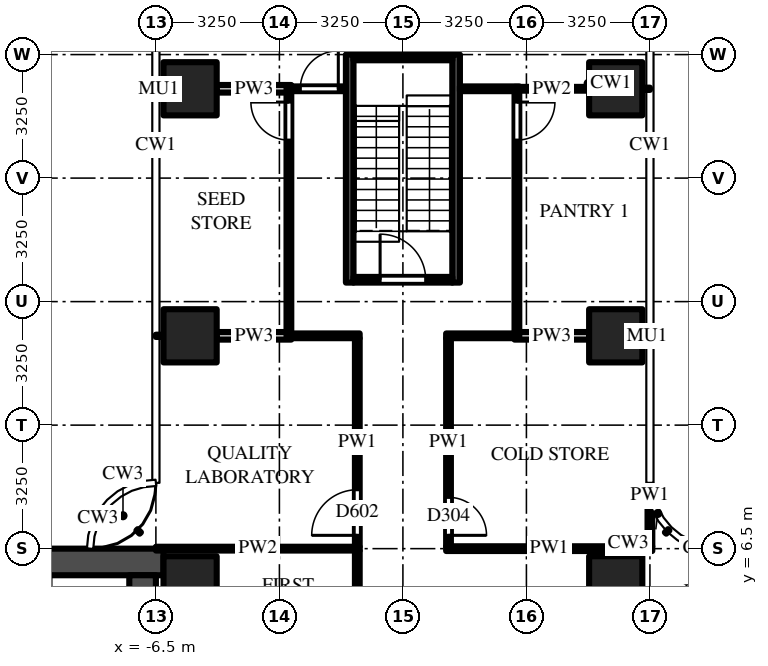
"""IFC4 building model, lengths in metres.
Left out: names, types, materials, properties, quantities, classifications, styles, units other than length and angle.
Written with IfcOpenShell. Run it as: python <this file> out.ifc"""

import sys

from ifc_helpers import new_model, si_unit, direction, frame, frame_2d, origin, origin_2d, place, context, subcontext, project, spatial, rectangle, extrude, source, transform, mapped, element, fill, save


model = new_model("IFC4")
c1 = context("Model", 3, precision=1e-05, world=origin(), true_north=direction((0.0, 1.0)))
c2 = subcontext(c1, "Body", "Model", "MODEL_VIEW")
j1 = project(units=[si_unit("LENGTHUNIT", "METRE"), si_unit("PLANEANGLEUNIT", "RADIAN")], contexts=[c1])
p1 = place(None, origin())
s1 = spatial("IfcSite", under=j1, at=p1, CompositionType="ELEMENT")
p2 = place(p1, origin())
s2 = spatial("IfcBuilding", under=s1, at=p2, CompositionType="ELEMENT")
p3 = place(p2, frame((0.0, 0.0, 38.5)))
s3 = spatial("IfcBuildingStorey", under=s2, at=p3, CompositionType="ELEMENT", Elevation=38.5)
m1 = source(origin(), c2, "Body", "SweptSolid", [
    extrude(rectangle(XDim=1.4, YDim=1.4, at=origin_2d()), origin(), (0.0, 0.0, 1.0), 4.5),
])
for number, where, z_axis, x_axis in (
    (1, (-5.6, 12.1, 0.0), (0.0, 0.0, 1.0), (1.0, 0.0, 0.0)),
    (2, (-5.6, 18.6, 0.0), (0.0, 0.0, 1.0), (1.0, 0.0, 0.0)),
    (3, (5.6, 12.1, 0.0), (0.0, 0.0, 1.0), (1.0, 0.0, 0.0)),
    (4, (5.6, 18.6, 0.0), (0.0, 0.0, 1.0), (1.0, 0.0, 0.0)),
    (5, (5.6, 5.6, 0.0), (0.0, 0.0, 1.0), (1.0, 0.0, 0.0)),
    (6, (-5.6, 5.6, 0.0), (0.0, 0.0, 1.0), (1.0, 0.0, 0.0)),
):
    element("IfcColumn", number, at=place(p3, frame(where, z_axis=z_axis, x_axis=x_axis)), inside=s3, PredefinedType="COLUMN", context=c2, shape_type="MappedRepresentation", body=[
        mapped(m1, transform((0.0, 0.0, 0.0))),
    ])
m2 = source(origin(), c2, "Body", "SweptSolid", [
    extrude(rectangle(XDim=16.45, YDim=0.7, at=frame_2d((8.225, 0.0))), origin(), (0.0, 0.0, 1.0), 4.25),
])
p4 = place(p3, frame((-6.3, 6.15, 0.0), z_axis=(0.0, 0.0, 1.0), x_axis=(-1.0, 0.0, 0.0)))
e7 = element("IfcWall", 7, at=p4, inside=s3, PredefinedType="SHEAR", context=c2, shape_type="MappedRepresentation", body=[
    mapped(m2, transform((0.0, 0.0, 0.0))),
])
m3 = source(origin(), c2, "Body", "SweptSolid", [
    extrude(rectangle(XDim=9.05, YDim=0.7, at=frame_2d((4.525, 0.0))), origin(), (0.0, 0.0, 1.0), 4.25),
])
p5 = place(p3, frame((-6.85, 5.8, 0.0), z_axis=(0.0, 0.0, 1.0), x_axis=(0.0, -1.0, 0.0)))
e8 = element("IfcWall", 8, at=p5, inside=s3, PredefinedType="SHEAR", context=c2, shape_type="MappedRepresentation", body=[
    mapped(m3, transform((0.0, 0.0, 0.0))),
])
m4 = source(origin(), c2, "Body", "SweptSolid", [
    extrude(rectangle(XDim=1.8, YDim=2.1, at=frame_2d((0.9, 1.05))), frame((0.0, 0.36, 0.0), z_axis=(0.0, -1.0, 0.0), x_axis=(1.0, 0.0, 0.0)), (0.0, 0.0, 1.0), 0.72),
])
p6 = place(p5, frame((3.15, 0.0, 0.0)))
e9 = element("IfcOpeningElement", 9, at=p6, cuts=e8, PredefinedType="OPENING", context=c2, shape_type="MappedRepresentation", body=[
    mapped(m4, transform((0.0, 0.0, 0.0))),
])
m5 = source(origin(), c2, "Body", "SweptSolid", [
    extrude(rectangle(XDim=6.0, YDim=0.2, at=frame_2d((3.0, 0.0))), origin(), (0.0, 0.0, 1.0), 4.25),
])
for number, where, z_axis, x_axis in (
    (10, (-1.4, 13.5, 0.0), (0.0, 0.0, 1.0), (0.0, 1.0, 0.0)),
    (11, (1.4, 13.5, 0.0), (0.0, 0.0, 1.0), (0.0, 1.0, 0.0)),
):
    element("IfcWall", number, at=place(p3, frame(where, z_axis=z_axis, x_axis=x_axis)), inside=s3, PredefinedType="SHEAR", context=c2, shape_type="MappedRepresentation", body=[
        mapped(m5, transform((0.0, 0.0, 0.0))),
    ])
m6 = source(origin(), c2, "Body", "SweptSolid", [
    extrude(rectangle(XDim=2.6, YDim=0.15, at=frame_2d((1.3, 0.0))), origin(), (0.0, 0.0, 1.0), 4.25),
])
p7 = place(p3, frame((-1.3, 13.575, 0.0), z_axis=(0.0, 0.0, 1.0), x_axis=(1.0, 0.0, 0.0)))
e12 = element("IfcWall", 12, at=p7, inside=s3, PredefinedType="SHEAR", context=c2, shape_type="MappedRepresentation", body=[
    mapped(m6, transform((0.0, 0.0, 0.0))),
])
m7 = source(origin(), c2, "Body", "SweptSolid", [
    extrude(rectangle(XDim=1.2, YDim=2.1, at=frame_2d((0.6, 1.05))), frame((0.0, 0.085, 0.0), z_axis=(0.0, -1.0, 0.0), x_axis=(1.0, 0.0, 0.0)), (0.0, 0.0, 1.0), 0.17),
])
p8 = place(p7, frame((0.7, 0.0, 0.0)))
e13 = element("IfcOpeningElement", 13, at=p8, cuts=e12, PredefinedType="OPENING", context=c2, shape_type="MappedRepresentation", body=[
    mapped(m7, transform((0.0, 0.0, 0.0))),
])
p9 = place(p3, frame((-1.3, 19.425, 0.0), z_axis=(0.0, 0.0, 1.0), x_axis=(1.0, 0.0, 0.0)))
e14 = element("IfcWall", 14, at=p9, inside=s3, PredefinedType="SHEAR", context=c2, shape_type="MappedRepresentation", body=[
    mapped(m6, transform((0.0, 0.0, 0.0))),
])
m8 = source(origin(), c2, "Body", "SweptSolid", [
    extrude(rectangle(XDim=6.3, YDim=0.125, at=frame_2d((3.15, 0.0))), origin(), (0.0, 0.0, 1.0), 3.468),
])
p10 = place(p3, frame((-3.0, 12.2, 0.0), z_axis=(0.0, 0.0, 1.0), x_axis=(0.0, 1.0, 0.0)))
e15 = element("IfcWall", 15, at=p10, inside=s3, PredefinedType="PARTITIONING", context=c2, shape_type="MappedRepresentation", body=[
    mapped(m8, transform((0.0, 0.0, 0.0))),
])
m9 = source(origin(), c2, "Body", "SweptSolid", [
    extrude(rectangle(XDim=1.0, YDim=2.1, at=frame_2d((0.5, 1.05))), frame((0.0, 0.073, 0.0), z_axis=(0.0, -1.0, 0.0), x_axis=(1.0, 0.0, 0.0)), (0.0, 0.0, 1.0), 0.145),
])
p11 = place(p10, frame((5.05, 0.0, 0.0)))
e16 = element("IfcOpeningElement", 16, at=p11, cuts=e15, PredefinedType="OPENING", context=c2, shape_type="MappedRepresentation", body=[
    mapped(m9, transform((0.0, 0.0, 0.0))),
])
m10 = source(origin(), c2, "Body", "SweptSolid", [
    extrude(rectangle(XDim=3.137, YDim=0.125, at=frame_2d((1.569, 0.0))), origin(), (0.0, 0.0, 1.0), 3.468),
])
p12 = place(p3, frame((-1.2, 6.45, 0.0), z_axis=(0.0, 0.0, 1.0), x_axis=(0.0, -1.0, 0.0)))
e17 = element("IfcWall", 17, at=p12, inside=s3, PredefinedType="PARTITIONING", context=c2, shape_type="MappedRepresentation", body=[
    mapped(m10, transform((0.0, 0.0, 0.0))),
])
m11 = source(origin(), c2, "Body", "SweptSolid", [
    extrude(rectangle(XDim=5.488, YDim=0.125, at=frame_2d((2.744, 0.0))), origin(), (0.0, 0.0, 1.0), 3.468),
])
p13 = place(p3, frame((-1.2, 6.55, 0.0), z_axis=(0.0, 0.0, 1.0), x_axis=(0.0, 1.0, 0.0)))
e18 = element("IfcWall", 18, at=p13, inside=s3, PredefinedType="PARTITIONING", context=c2, shape_type="MappedRepresentation", body=[
    mapped(m11, transform((0.0, 0.0, 0.0))),
])
m12 = source(origin(), c2, "Body", "SweptSolid", [
    extrude(rectangle(XDim=1.2, YDim=2.1, at=frame_2d((0.6, 1.05))), frame((0.0, 0.073, 0.0), z_axis=(0.0, -1.0, 0.0), x_axis=(1.0, 0.0, 0.0)), (0.0, 0.0, 1.0), 0.145),
])
p14 = place(p13, frame((0.3, 0.0, 0.0)))
e19 = element("IfcOpeningElement", 19, at=p14, cuts=e18, PredefinedType="OPENING", context=c2, shape_type="MappedRepresentation", body=[
    mapped(m12, transform((0.0, 0.0, 0.0))),
])
m13 = source(origin(), c2, "Body", "SweptSolid", [
    extrude(rectangle(XDim=5.475, YDim=0.125, at=frame_2d((2.738, 0.0))), origin(), (0.0, 0.0, 1.0), 3.468),
])
p15 = place(p3, frame((1.2, 12.038, 0.0), z_axis=(0.0, 0.0, 1.0), x_axis=(0.0, -1.0, 0.0)))
e20 = element("IfcWall", 20, at=p15, inside=s3, PredefinedType="PARTITIONING", context=c2, shape_type="MappedRepresentation", body=[
    mapped(m13, transform((0.0, 0.0, 0.0))),
])
p16 = place(p15, frame((4.188, 0.0, 0.0)))
e21 = element("IfcOpeningElement", 21, at=p16, cuts=e20, PredefinedType="OPENING", context=c2, shape_type="MappedRepresentation", body=[
    mapped(m9, transform((0.0, 0.0, 0.0))),
])
m14 = source(origin(), c2, "Body", "SweptSolid", [
    extrude(rectangle(XDim=6.35, YDim=0.125, at=frame_2d((3.175, 0.0))), origin(), (0.0, 0.0, 1.0), 3.468),
])
p17 = place(p3, frame((3.0, 18.55, 0.0), z_axis=(0.0, 0.0, 1.0), x_axis=(0.0, -1.0, 0.0)))
e22 = element("IfcWall", 22, at=p17, inside=s3, PredefinedType="PARTITIONING", context=c2, shape_type="MappedRepresentation", body=[
    mapped(m14, transform((0.0, 0.0, 0.0))),
])
p18 = place(p17, frame((0.3, 0.0, 0.0)))
e23 = element("IfcOpeningElement", 23, at=p18, cuts=e22, PredefinedType="OPENING", context=c2, shape_type="MappedRepresentation", body=[
    mapped(m9, transform((0.0, 0.0, 0.0))),
])
m15 = source(origin(), c2, "Body", "SweptSolid", [
    extrude(rectangle(XDim=1.469, YDim=0.125, at=frame_2d((0.734, 0.0))), origin(), (0.0, 0.0, 1.0), 4.25),
])
p19 = place(p3, frame((6.5, 6.562, 0.0), z_axis=(0.0, 0.0, 1.0), x_axis=(0.0, 1.0, 0.0)))
e24 = element("IfcWall", 24, at=p19, inside=s3, PredefinedType="PARTITIONING", context=c2, shape_type="MappedRepresentation", body=[
    mapped(m15, transform((0.0, 0.0, 0.0))),
])
m16 = source(origin(), c2, "Body", "SweptSolid", [
    extrude(rectangle(XDim=5.363, YDim=0.1, at=frame_2d((2.681, 0.0))), origin(), (0.0, 0.0, 1.0), 3.33),
])
p20 = place(p3, frame((-6.5, 6.5, 0.0), z_axis=(0.0, 0.0, 1.0), x_axis=(1.0, 0.0, 0.0)))
e25 = element("IfcWall", 25, at=p20, inside=s3, PredefinedType="PARTITIONING", context=c2, shape_type="MappedRepresentation", body=[
    mapped(m16, transform((0.0, 0.0, 0.0))),
])
m17 = source(origin(), c2, "Body", "SweptSolid", [
    extrude(rectangle(XDim=5.425, YDim=0.125, at=frame_2d((2.712, 0.0))), origin(), (0.0, 0.0, 1.0), 3.33),
])
p21 = place(p3, frame((1.137, 6.5, 0.0), z_axis=(0.0, 0.0, 1.0), x_axis=(1.0, 0.0, 0.0)))
e26 = element("IfcWall", 26, at=p21, inside=s3, PredefinedType="PARTITIONING", context=c2, shape_type="MappedRepresentation", body=[
    mapped(m17, transform((0.0, 0.0, 0.0))),
])
m18 = source(origin(), c2, "Body", "SweptSolid", [
    extrude(rectangle(XDim=1.962, YDim=0.2, at=frame_2d((0.981, 0.0))), origin(), (0.0, 0.0, 1.0), 3.468),
])
for number, where, z_axis, x_axis in (
    (27, (-4.9, 12.1, 0.0), (0.0, 0.0, 1.0), (1.0, 0.0, 0.0)),
    (28, (2.938, 12.1, 0.0), (0.0, 0.0, 1.0), (1.0, 0.0, 0.0)),
):
    element("IfcWall", number, at=place(p3, frame(where, z_axis=z_axis, x_axis=x_axis)), inside=s3, PredefinedType="PARTITIONING", context=c2, shape_type="MappedRepresentation", body=[
        mapped(m18, transform((0.0, 0.0, 0.0))),
    ])
m19 = source(origin(), c2, "Body", "SweptSolid", [
    extrude(rectangle(XDim=1.925, YDim=0.125, at=frame_2d((0.962, 0.0))), origin(), (0.0, 0.0, 1.0), 3.468),
])
for number, where, z_axis, x_axis in (
    (29, (-1.137, 12.1, 0.0), (0.0, 0.0, 1.0), (-1.0, 0.0, 0.0)),
    (30, (3.062, 12.1, 0.0), (0.0, 0.0, 1.0), (-1.0, 0.0, 0.0)),
):
    element("IfcWall", number, at=place(p3, frame(where, z_axis=z_axis, x_axis=x_axis)), inside=s3, PredefinedType="PARTITIONING", context=c2, shape_type="MappedRepresentation", body=[
        mapped(m19, transform((0.0, 0.0, 0.0))),
    ])
m20 = source(origin(), c2, "Body", "SweptSolid", [
    extrude(rectangle(XDim=1.962, YDim=0.2, at=frame_2d((0.981, 0.0))), origin(), (0.0, 0.0, 1.0), 3.697),
])
p22 = place(p3, frame((-4.9, 18.6, 0.0), z_axis=(0.0, 0.0, 1.0), x_axis=(1.0, 0.0, 0.0)))
e31 = element("IfcWall", 31, at=p22, inside=s3, PredefinedType="PARTITIONING", context=c2, shape_type="MappedRepresentation", body=[
    mapped(m20, transform((0.0, 0.0, 0.0))),
])
m21 = source(origin(), c2, "Body", "SweptSolid", [
    extrude(rectangle(XDim=1.962, YDim=0.1, at=frame_2d((0.981, 0.0))), origin(), (0.0, 0.0, 1.0), 3.697),
])
p23 = place(p3, frame((2.938, 18.6, 0.0), z_axis=(0.0, 0.0, 1.0), x_axis=(1.0, 0.0, 0.0)))
e32 = element("IfcWall", 32, at=p23, inside=s3, PredefinedType="PARTITIONING", context=c2, shape_type="MappedRepresentation", body=[
    mapped(m21, transform((0.0, 0.0, 0.0))),
])
m22 = source(origin(), c2, "Body", "SweptSolid", [
    extrude(rectangle(XDim=1.562, YDim=0.125, at=frame_2d((0.781, 0.0))), origin(), (0.0, 0.0, 1.0), 3.697),
])
p24 = place(p3, frame((-3.062, 18.6, 0.0), z_axis=(0.0, 0.0, 1.0), x_axis=(1.0, 0.0, 0.0)))
e33 = element("IfcWall", 33, at=p24, inside=s3, PredefinedType="PARTITIONING", context=c2, shape_type="MappedRepresentation", body=[
    mapped(m22, transform((0.0, 0.0, 0.0))),
])
p25 = place(p24, frame((0.363, 0.0, 0.0)))
e34 = element("IfcOpeningElement", 34, at=p25, cuts=e33, PredefinedType="OPENING", context=c2, shape_type="MappedRepresentation", body=[
    mapped(m9, transform((0.0, 0.0, 0.0))),
])
p26 = place(p3, frame((1.5, 18.6, 0.0), z_axis=(0.0, 0.0, 1.0), x_axis=(1.0, 0.0, 0.0)))
e35 = element("IfcWall", 35, at=p26, inside=s3, PredefinedType="PARTITIONING", context=c2, shape_type="MappedRepresentation", body=[
    mapped(m22, transform((0.0, 0.0, 0.0))),
])
m23 = source(origin(), c2, "Body", "SweptSolid", [
    extrude(rectangle(XDim=1.2, YDim=2.1, at=frame_2d((0.6, 1.05))), frame((0.0, 0.025, 0.0), z_axis=(0.0, -1.0, 0.0), x_axis=(1.0, 0.0, 0.0)), (0.0, 0.0, 1.0), 0.05),
])
p27 = place(p8, origin())
e36 = element("IfcDoor", 36, at=p27, inside=s3, OperationType="SINGLE_SWING_LEFT", PredefinedType="DOOR", context=c2, shape_type="MappedRepresentation", body=[
    mapped(m23, transform((0.0, 0.0, 0.0))),
])
fill(e13, e36)
m24 = source(origin(), c2, "Body", "SweptSolid", [
    extrude(rectangle(XDim=1.0, YDim=2.1, at=frame_2d((0.5, 1.05))), frame((0.0, 0.025, 0.0), z_axis=(0.0, -1.0, 0.0), x_axis=(1.0, 0.0, 0.0)), (0.0, 0.0, 1.0), 0.05),
])
p28 = place(p16, origin())
e37 = element("IfcDoor", 37, at=p28, inside=s3, OperationType="SINGLE_SWING_RIGHT", PredefinedType="DOOR", context=c2, shape_type="MappedRepresentation", body=[
    mapped(m24, transform((0.0, 0.0, 0.0))),
])
fill(e21, e37)
p29 = place(p14, origin())
e38 = element("IfcDoor", 38, at=p29, inside=s3, OperationType="SINGLE_SWING_LEFT", PredefinedType="DOOR", context=c2, shape_type="MappedRepresentation", body=[
    mapped(m23, transform((0.0, 0.0, 0.0))),
])
fill(e19, e38)
p30 = place(p11, origin())
e39 = element("IfcDoor", 39, at=p30, inside=s3, OperationType="SINGLE_SWING_RIGHT", PredefinedType="DOOR", context=c2, shape_type="MappedRepresentation", body=[
    mapped(m24, transform((0.0, 0.0, 0.0))),
])
fill(e16, e39)
p31 = place(p18, origin())
e40 = element("IfcDoor", 40, at=p31, inside=s3, OperationType="SINGLE_SWING_LEFT", PredefinedType="DOOR", context=c2, shape_type="MappedRepresentation", body=[
    mapped(m24, transform((0.0, 0.0, 0.0))),
])
fill(e23, e40)
p32 = place(p25, origin())
e41 = element("IfcDoor", 41, at=p32, inside=s3, OperationType="SINGLE_SWING_RIGHT", PredefinedType="DOOR", context=c2, shape_type="MappedRepresentation", body=[
    mapped(m24, transform((0.0, 0.0, 0.0))),
])
fill(e34, e41)
save(model, sys.argv[1])
